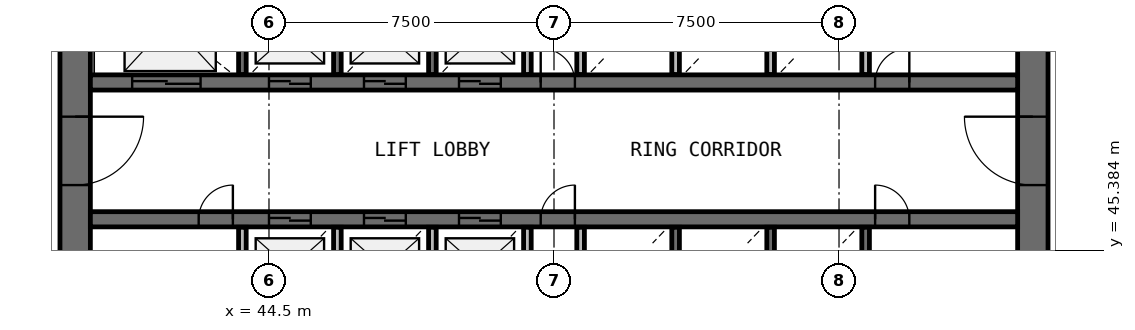
"""IFC4 building model, lengths in metres.
Left out: names, types, materials, properties, quantities, classifications, styles, units other than length and angle.
Written with IfcOpenShell. Run it as: python <this file> out.ifc"""

import sys

from ifc_helpers import new_model, si_unit, direction, frame, frame_2d, origin, place, context, subcontext, project, spatial, rectangle, extrude, source, transform, mapped, element, fill, save


model = new_model("IFC4")
c1 = context("Model", 3, precision=1e-05, world=origin(), true_north=direction((0.0, 1.0)))
c2 = subcontext(c1, "Body", "Model", "MODEL_VIEW")
j1 = project(units=[si_unit("LENGTHUNIT", "METRE"), si_unit("PLANEANGLEUNIT", "RADIAN")], contexts=[c1])
p1 = place(None, origin())
s1 = spatial("IfcSite", under=j1, at=p1, CompositionType="ELEMENT")
p2 = place(p1, origin())
s2 = spatial("IfcBuilding", under=s1, at=p2, CompositionType="ELEMENT")
p3 = place(p2, frame((0.0, 0.0, 104.4)))
s3 = spatial("IfcBuildingStorey", under=s2, at=p3, CompositionType="ELEMENT", Elevation=104.4)
p4 = place(p3, frame((64.6, 38.0, 0.0), z_axis=(0.0, 0.0, 1.0), x_axis=(0.0, 1.0, 0.0)))
e1 = element("IfcWall", 1, at=p4, inside=s3, PredefinedType="SHEAR", context=c2, shape_type="SweptSolid", body=[
    extrude(rectangle(XDim=20.0, YDim=0.8, at=frame_2d((10.0, 0.0))), origin(), (0.0, 0.0, 1.0), 4.1),
])
p5 = place(p4, frame((9.1, 0.0, 0.0)))
e2 = element("IfcOpeningElement", 2, at=p5, cuts=e1, PredefinedType="OPENING", context=c2, shape_type="SweptSolid", body=[
    extrude(rectangle(XDim=1.8, YDim=2.1, at=frame_2d((0.9, 1.05))), frame((0.0, 0.41, 0.0), z_axis=(0.0, -1.0, 0.0), x_axis=(1.0, 0.0, 0.0)), (0.0, 0.0, 1.0), 0.82),
])
p6 = place(p3, frame((39.4, 58.0, 0.0), z_axis=(0.0, 0.0, 1.0), x_axis=(0.0, -1.0, 0.0)))
e3 = element("IfcWall", 3, at=p6, inside=s3, PredefinedType="SHEAR", context=c2, shape_type="SweptSolid", body=[
    extrude(rectangle(XDim=20.0, YDim=0.8, at=frame_2d((10.0, 0.0))), origin(), (0.0, 0.0, 1.0), 4.1),
])
p7 = place(p6, frame((9.1, 0.0, 0.0)))
e4 = element("IfcOpeningElement", 4, at=p7, cuts=e3, PredefinedType="OPENING", context=c2, shape_type="SweptSolid", body=[
    extrude(rectangle(XDim=1.8, YDim=2.1, at=frame_2d((0.9, 1.05))), frame((0.0, 0.41, 0.0), z_axis=(0.0, -1.0, 0.0), x_axis=(1.0, 0.0, 0.0)), (0.0, 0.0, 1.0), 0.82),
])
p8 = place(p3, frame((39.8, 49.8, 0.0), z_axis=(0.0, 0.0, 1.0), x_axis=(1.0, 0.0, 0.0)))
e5 = element("IfcWall", 5, at=p8, inside=s3, PredefinedType="SHEAR", context=c2, shape_type="SweptSolid", body=[
    extrude(rectangle(XDim=24.4, YDim=0.4, at=frame_2d((12.2, 0.0))), origin(), (0.0, 0.0, 1.0), 4.1),
])
p9 = place(p8, frame((4.7, 0.0, 0.0)))
e6 = element("IfcOpeningElement", 6, at=p9, cuts=e5, PredefinedType="OPENING", context=c2, shape_type="SweptSolid", body=[
    extrude(rectangle(XDim=1.1, YDim=2.1, at=frame_2d((0.55, 1.05))), frame((0.0, 0.21, 0.0), z_axis=(0.0, -1.0, 0.0), x_axis=(1.0, 0.0, 0.0)), (0.0, 0.0, 1.0), 0.42),
])
p10 = place(p8, frame((7.2, 0.0, 0.0)))
e7 = element("IfcOpeningElement", 7, at=p10, cuts=e5, PredefinedType="OPENING", context=c2, shape_type="SweptSolid", body=[
    extrude(rectangle(XDim=1.1, YDim=2.1, at=frame_2d((0.55, 1.05))), frame((0.0, 0.21, 0.0), z_axis=(0.0, -1.0, 0.0), x_axis=(1.0, 0.0, 0.0)), (0.0, 0.0, 1.0), 0.42),
])
p11 = place(p8, frame((9.7, 0.0, 0.0)))
e8 = element("IfcOpeningElement", 8, at=p11, cuts=e5, PredefinedType="OPENING", context=c2, shape_type="SweptSolid", body=[
    extrude(rectangle(XDim=1.1, YDim=2.1, at=frame_2d((0.55, 1.05))), frame((0.0, 0.21, 0.0), z_axis=(0.0, -1.0, 0.0), x_axis=(1.0, 0.0, 0.0)), (0.0, 0.0, 1.0), 0.42),
])
p12 = place(p8, frame((1.1, 0.0, 0.0)))
e9 = element("IfcOpeningElement", 9, at=p12, cuts=e5, PredefinedType="OPENING", context=c2, shape_type="SweptSolid", body=[
    extrude(rectangle(XDim=1.8, YDim=2.4, at=frame_2d((0.9, 1.2))), frame((0.0, 0.21, 0.0), z_axis=(0.0, -1.0, 0.0), x_axis=(1.0, 0.0, 0.0)), (0.0, 0.0, 1.0), 0.42),
])
p13 = place(p8, frame((20.65, 0.0, 0.0)))
e10 = element("IfcOpeningElement", 10, at=p13, cuts=e5, PredefinedType="OPENING", context=c2, shape_type="SweptSolid", body=[
    extrude(rectangle(XDim=0.9, YDim=2.1, at=frame_2d((0.45, 1.05))), frame((0.0, 0.21, 0.0), z_axis=(0.0, -1.0, 0.0), x_axis=(1.0, 0.0, 0.0)), (0.0, 0.0, 1.0), 0.42),
])
p14 = place(p8, frame((11.85, 0.0, 0.0)))
e11 = element("IfcOpeningElement", 11, at=p14, cuts=e5, PredefinedType="OPENING", context=c2, shape_type="SweptSolid", body=[
    extrude(rectangle(XDim=0.9, YDim=2.1, at=frame_2d((0.45, 1.05))), frame((0.0, 0.21, 0.0), z_axis=(0.0, -1.0, 0.0), x_axis=(1.0, 0.0, 0.0)), (0.0, 0.0, 1.0), 0.42),
])
p15 = place(p3, frame((39.8, 46.2, 0.0), z_axis=(0.0, 0.0, 1.0), x_axis=(1.0, 0.0, 0.0)))
e12 = element("IfcWall", 12, at=p15, inside=s3, PredefinedType="SHEAR", context=c2, shape_type="SweptSolid", body=[
    extrude(rectangle(XDim=24.4, YDim=0.4, at=frame_2d((12.2, 0.0))), origin(), (0.0, 0.0, 1.0), 4.1),
])
p16 = place(p15, frame((4.7, 0.0, 0.0)))
e13 = element("IfcOpeningElement", 13, at=p16, cuts=e12, PredefinedType="OPENING", context=c2, shape_type="SweptSolid", body=[
    extrude(rectangle(XDim=1.1, YDim=2.1, at=frame_2d((0.55, 1.05))), frame((0.0, 0.21, 0.0), z_axis=(0.0, -1.0, 0.0), x_axis=(1.0, 0.0, 0.0)), (0.0, 0.0, 1.0), 0.42),
])
p17 = place(p15, frame((7.2, 0.0, 0.0)))
e14 = element("IfcOpeningElement", 14, at=p17, cuts=e12, PredefinedType="OPENING", context=c2, shape_type="SweptSolid", body=[
    extrude(rectangle(XDim=1.1, YDim=2.1, at=frame_2d((0.55, 1.05))), frame((0.0, 0.21, 0.0), z_axis=(0.0, -1.0, 0.0), x_axis=(1.0, 0.0, 0.0)), (0.0, 0.0, 1.0), 0.42),
])
p18 = place(p15, frame((9.7, 0.0, 0.0)))
e15 = element("IfcOpeningElement", 15, at=p18, cuts=e12, PredefinedType="OPENING", context=c2, shape_type="SweptSolid", body=[
    extrude(rectangle(XDim=1.1, YDim=2.1, at=frame_2d((0.55, 1.05))), frame((0.0, 0.21, 0.0), z_axis=(0.0, -1.0, 0.0), x_axis=(1.0, 0.0, 0.0)), (0.0, 0.0, 1.0), 0.42),
])
p19 = place(p15, frame((20.65, 0.0, 0.0)))
e16 = element("IfcOpeningElement", 16, at=p19, cuts=e12, PredefinedType="OPENING", context=c2, shape_type="SweptSolid", body=[
    extrude(rectangle(XDim=0.9, YDim=2.1, at=frame_2d((0.45, 1.05))), frame((0.0, 0.21, 0.0), z_axis=(0.0, -1.0, 0.0), x_axis=(1.0, 0.0, 0.0)), (0.0, 0.0, 1.0), 0.42),
])
p20 = place(p15, frame((2.85, 0.0, 0.0)))
e17 = element("IfcOpeningElement", 17, at=p20, cuts=e12, PredefinedType="OPENING", context=c2, shape_type="SweptSolid", body=[
    extrude(rectangle(XDim=0.9, YDim=2.1, at=frame_2d((0.45, 1.05))), frame((0.0, 0.21, 0.0), z_axis=(0.0, -1.0, 0.0), x_axis=(1.0, 0.0, 0.0)), (0.0, 0.0, 1.0), 0.42),
])
p21 = place(p15, frame((11.85, 0.0, 0.0)))
e18 = element("IfcOpeningElement", 18, at=p21, cuts=e12, PredefinedType="OPENING", context=c2, shape_type="SweptSolid", body=[
    extrude(rectangle(XDim=0.9, YDim=2.1, at=frame_2d((0.45, 1.05))), frame((0.0, 0.21, 0.0), z_axis=(0.0, -1.0, 0.0), x_axis=(1.0, 0.0, 0.0)), (0.0, 0.0, 1.0), 0.42),
])
for number, where, z_axis, x_axis in (
    (19, (43.8, 45.99, 0.0), (0.0, 0.0, 1.0), (0.0, -1.0, 0.0)),
    (20, (43.8, 52.37, 0.0), (0.0, 0.0, 1.0), (0.0, -1.0, 0.0)),
):
    element("IfcWall", number, at=place(p3, frame(where, z_axis=z_axis, x_axis=x_axis)), inside=s3, PredefinedType="SOLIDWALL", context=c2, shape_type="SweptSolid", body=[
        extrude(rectangle(XDim=2.36, YDim=0.2, at=frame_2d((1.18, 0.0))), origin(), (0.0, 0.0, 1.0), 3.7),
    ])
p22 = place(p3, frame((46.3, 43.6, 0.0), z_axis=(0.0, 0.0, 1.0), x_axis=(0.0, 1.0, 0.0)))
e21 = element("IfcWall", 21, at=p22, inside=s3, PredefinedType="SOLIDWALL", context=c2, shape_type="SweptSolid", body=[
    extrude(rectangle(XDim=2.39, YDim=0.2, at=frame_2d((1.195, 0.0))), origin(), (0.0, 0.0, 1.0), 3.7),
])
for number, where, z_axis, x_axis in (
    (22, (46.3, 50.01, 0.0), (0.0, 0.0, 1.0), (0.0, 1.0, 0.0)),
    (23, (48.8, 43.63, 0.0), (0.0, 0.0, 1.0), (0.0, 1.0, 0.0)),
    (24, (48.8, 50.01, 0.0), (0.0, 0.0, 1.0), (0.0, 1.0, 0.0)),
    (25, (51.3, 43.63, 0.0), (0.0, 0.0, 1.0), (0.0, 1.0, 0.0)),
):
    element("IfcWall", number, at=place(p3, frame(where, z_axis=z_axis, x_axis=x_axis)), inside=s3, PredefinedType="SOLIDWALL", context=c2, shape_type="SweptSolid", body=[
        extrude(rectangle(XDim=2.36, YDim=0.2, at=frame_2d((1.18, 0.0))), origin(), (0.0, 0.0, 1.0), 3.7),
    ])
for number, where, z_axis, x_axis in (
    (26, (51.3, 50.01, 0.0), (0.0, 0.0, 1.0), (0.0, 1.0, 0.0)),
    (27, (52.7, 45.99, 0.0), (0.0, 0.0, 1.0), (0.0, -1.0, 0.0)),
):
    element("IfcWall", number, at=place(p3, frame(where, z_axis=z_axis, x_axis=x_axis)), inside=s3, PredefinedType="SOLIDWALL", context=c2, shape_type="SweptSolid", body=[
        extrude(rectangle(XDim=2.39, YDim=0.2, at=frame_2d((1.195, 0.0))), origin(), (0.0, 0.0, 1.0), 3.7),
    ])
for number, where, z_axis, x_axis in (
    (28, (52.7, 52.37, 0.0), (0.0, 0.0, 1.0), (0.0, -1.0, 0.0)),
    (29, (55.2, 43.63, 0.0), (0.0, 0.0, 1.0), (0.0, 1.0, 0.0)),
    (30, (55.2, 50.01, 0.0), (0.0, 0.0, 1.0), (0.0, 1.0, 0.0)),
    (31, (57.7, 43.63, 0.0), (0.0, 0.0, 1.0), (0.0, 1.0, 0.0)),
):
    element("IfcWall", number, at=place(p3, frame(where, z_axis=z_axis, x_axis=x_axis)), inside=s3, PredefinedType="SOLIDWALL", context=c2, shape_type="SweptSolid", body=[
        extrude(rectangle(XDim=2.36, YDim=0.2, at=frame_2d((1.18, 0.0))), origin(), (0.0, 0.0, 1.0), 3.7),
    ])
p23 = place(p3, frame((57.7, 50.01, 0.0), z_axis=(0.0, 0.0, 1.0), x_axis=(0.0, 1.0, 0.0)))
e32 = element("IfcWall", 32, at=p23, inside=s3, PredefinedType="SOLIDWALL", context=c2, shape_type="SweptSolid", body=[
    extrude(rectangle(XDim=2.39, YDim=0.2, at=frame_2d((1.195, 0.0))), origin(), (0.0, 0.0, 1.0), 3.7),
])
for number, where, z_axis, x_axis in (
    (33, (60.2, 43.63, 0.0), (0.0, 0.0, 1.0), (0.0, 1.0, 0.0)),
    (34, (60.2, 50.01, 0.0), (0.0, 0.0, 1.0), (0.0, 1.0, 0.0)),
):
    element("IfcWall", number, at=place(p3, frame(where, z_axis=z_axis, x_axis=x_axis)), inside=s3, PredefinedType="SOLIDWALL", context=c2, shape_type="SweptSolid", body=[
        extrude(rectangle(XDim=2.36, YDim=0.2, at=frame_2d((1.18, 0.0))), origin(), (0.0, 0.0, 1.0), 3.7),
    ])
m1 = source(origin(), c2, "Body", "SweptSolid", [
    extrude(rectangle(XDim=1.8, YDim=2.1, at=frame_2d((0.9, 1.05))), frame((0.0, 0.025, 0.0), z_axis=(0.0, -1.0, 0.0), x_axis=(1.0, 0.0, 0.0)), (0.0, 0.0, 1.0), 0.05),
])
p24 = place(p7, origin())
e35 = element("IfcDoor", 35, at=p24, inside=s3, OperationType="SINGLE_SWING_LEFT", PredefinedType="DOOR", context=c2, shape_type="MappedRepresentation", body=[
    mapped(m1, transform((0.0, 0.0, 0.0), scale=1.0)),
])
fill(e4, e35)
p25 = place(p5, origin())
e36 = element("IfcDoor", 36, at=p25, inside=s3, OperationType="SINGLE_SWING_RIGHT", PredefinedType="DOOR", context=c2, shape_type="MappedRepresentation", body=[
    mapped(m1, transform((0.0, 0.0, 0.0), scale=1.0)),
])
fill(e2, e36)
m2 = source(origin(), c2, "Body", "SweptSolid", [
    extrude(rectangle(XDim=1.1, YDim=2.1, at=frame_2d((0.55, 1.05))), frame((0.0, 0.025, 0.0), z_axis=(0.0, -1.0, 0.0), x_axis=(1.0, 0.0, 0.0)), (0.0, 0.0, 1.0), 0.05),
])
p26 = place(p9, origin())
e37 = element("IfcDoor", 37, at=p26, inside=s3, OperationType="DOUBLE_DOOR_SLIDING", PredefinedType="USERDEFINED", context=c2, shape_type="MappedRepresentation", body=[
    mapped(m2, transform((0.0, 0.0, 0.0), scale=1.0)),
])
fill(e6, e37)
p27 = place(p10, origin())
e38 = element("IfcDoor", 38, at=p27, inside=s3, OperationType="DOUBLE_DOOR_SLIDING", PredefinedType="USERDEFINED", context=c2, shape_type="MappedRepresentation", body=[
    mapped(m2, transform((0.0, 0.0, 0.0), scale=1.0)),
])
fill(e7, e38)
p28 = place(p11, origin())
e39 = element("IfcDoor", 39, at=p28, inside=s3, OperationType="DOUBLE_DOOR_SLIDING", PredefinedType="USERDEFINED", context=c2, shape_type="MappedRepresentation", body=[
    mapped(m2, transform((0.0, 0.0, 0.0), scale=1.0)),
])
fill(e8, e39)
p29 = place(p16, origin())
e40 = element("IfcDoor", 40, at=p29, inside=s3, OperationType="DOUBLE_DOOR_SLIDING", PredefinedType="USERDEFINED", context=c2, shape_type="MappedRepresentation", body=[
    mapped(m2, transform((0.0, 0.0, 0.0), scale=1.0)),
])
fill(e13, e40)
p30 = place(p17, origin())
e41 = element("IfcDoor", 41, at=p30, inside=s3, OperationType="DOUBLE_DOOR_SLIDING", PredefinedType="USERDEFINED", context=c2, shape_type="MappedRepresentation", body=[
    mapped(m2, transform((0.0, 0.0, 0.0), scale=1.0)),
])
fill(e14, e41)
p31 = place(p18, origin())
e42 = element("IfcDoor", 42, at=p31, inside=s3, OperationType="DOUBLE_DOOR_SLIDING", PredefinedType="USERDEFINED", context=c2, shape_type="MappedRepresentation", body=[
    mapped(m2, transform((0.0, 0.0, 0.0), scale=1.0)),
])
fill(e15, e42)
m3 = source(origin(), c2, "Body", "SweptSolid", [
    extrude(rectangle(XDim=1.8, YDim=2.4, at=frame_2d((0.9, 1.2))), frame((0.0, 0.025, 0.0), z_axis=(0.0, -1.0, 0.0), x_axis=(1.0, 0.0, 0.0)), (0.0, 0.0, 1.0), 0.05),
])
p32 = place(p12, origin())
e43 = element("IfcDoor", 43, at=p32, inside=s3, OperationType="DOUBLE_DOOR_SLIDING", PredefinedType="USERDEFINED", context=c2, shape_type="MappedRepresentation", body=[
    mapped(m3, transform((0.0, 0.0, 0.0), scale=1.0)),
])
fill(e9, e43)
m4 = source(origin(), c2, "Body", "SweptSolid", [
    extrude(rectangle(XDim=0.9, YDim=2.1, at=frame_2d((0.45, 1.05))), frame((0.0, 0.025, 0.0), z_axis=(0.0, -1.0, 0.0), x_axis=(1.0, 0.0, 0.0)), (0.0, 0.0, 1.0), 0.05),
])
p33 = place(p19, origin())
e44 = element("IfcDoor", 44, at=p33, inside=s3, OperationType="SINGLE_SWING_LEFT", PredefinedType="DOOR", context=c2, shape_type="MappedRepresentation", body=[
    mapped(m4, transform((0.0, 0.0, 0.0), scale=1.0)),
])
fill(e16, e44)
p34 = place(p13, origin())
e45 = element("IfcDoor", 45, at=p34, inside=s3, OperationType="SINGLE_SWING_RIGHT", PredefinedType="DOOR", context=c2, shape_type="MappedRepresentation", body=[
    mapped(m4, transform((0.0, 0.0, 0.0), scale=1.0)),
])
fill(e10, e45)
p35 = place(p20, origin())
e46 = element("IfcDoor", 46, at=p35, inside=s3, OperationType="SINGLE_SWING_RIGHT", PredefinedType="DOOR", context=c2, shape_type="MappedRepresentation", body=[
    mapped(m4, transform((0.0, 0.0, 0.0), scale=1.0)),
])
fill(e17, e46)
p36 = place(p14, origin())
e47 = element("IfcDoor", 47, at=p36, inside=s3, OperationType="SINGLE_SWING_LEFT", PredefinedType="DOOR", context=c2, shape_type="MappedRepresentation", body=[
    mapped(m4, transform((0.0, 0.0, 0.0), scale=1.0)),
])
fill(e11, e47)
p37 = place(p21, origin())
e48 = element("IfcDoor", 48, at=p37, inside=s3, OperationType="SINGLE_SWING_RIGHT", PredefinedType="DOOR", context=c2, shape_type="MappedRepresentation", body=[
    mapped(m4, transform((0.0, 0.0, 0.0), scale=1.0)),
])
fill(e18, e48)
save(model, sys.argv[1])
